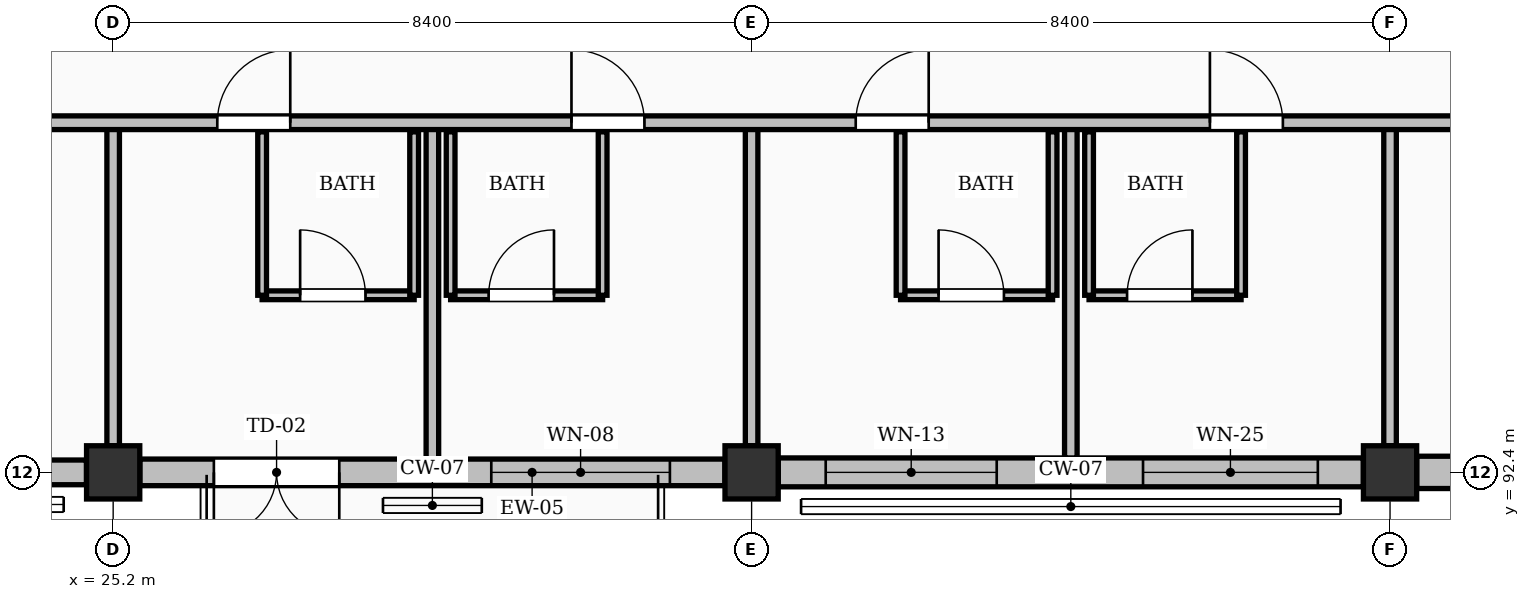
"""IFC4 building model, lengths in metres.
Left out: names, types, materials, properties, quantities, classifications, styles, units other than length and angle.
Written with IfcOpenShell. Run it as: python <this file> out.ifc"""

import sys

from ifc_helpers import new_model, si_unit, direction, frame, frame_2d, origin, origin_2d, place, context, subcontext, project, spatial, rectangle, extrude, element, fill, save


model = new_model("IFC4")
c1 = context("Model", 3, precision=1e-05, world=origin(), true_north=direction((0.0, 1.0)))
c2 = subcontext(c1, "Body", "Model", "MODEL_VIEW")
j1 = project(units=[si_unit("LENGTHUNIT", "METRE"), si_unit("PLANEANGLEUNIT", "RADIAN")], contexts=[c1])
p1 = place(None, origin())
s1 = spatial("IfcSite", under=j1, at=p1, CompositionType="ELEMENT")
p2 = place(p1, origin())
s2 = spatial("IfcBuilding", under=s1, at=p2, CompositionType="ELEMENT")
p3 = place(p2, frame((0.0, 0.0, 25.2)))
s3 = spatial("IfcBuildingStorey", under=s2, at=p3, CompositionType="ELEMENT", Elevation=25.2)
for number, where, z_axis, x_axis in (
    (1, (25.2, 92.4, 0.0), (0.0, 0.0, 1.0), (1.0, 0.0, 0.0)),
    (2, (33.6, 92.4, 0.0), (0.0, 0.0, 1.0), (1.0, 0.0, 0.0)),
    (3, (42.0, 92.4, 0.0), (0.0, 0.0, 1.0), (1.0, 0.0, 0.0)),
):
    element("IfcColumn", number, at=place(p3, frame(where, z_axis=z_axis, x_axis=x_axis)), inside=s3, PredefinedType="COLUMN", context=c2, shape_type="SweptSolid", body=[
        extrude(rectangle(XDim=0.7, YDim=0.7, at=origin_2d()), origin(), (0.0, 0.0, 1.0), 3.36),
    ])
p4 = place(p3, frame((17.151, 92.4, 0.0), z_axis=(0.0, 0.0, 1.0), x_axis=(1.0, 0.0, 0.0)))
e4 = element("IfcWall", 4, at=p4, inside=s3, PredefinedType="SOLIDWALL", context=c2, shape_type="SweptSolid", body=[
    extrude(rectangle(XDim=7.698, YDim=0.325, at=frame_2d((3.849, 0.0))), origin(), (0.0, 0.0, 1.0), 2.494),
])
p5 = place(p4, frame((0.574, 0.0, 0.25)))
e5 = element("IfcOpeningElement", 5, at=p5, cuts=e4, PredefinedType="OPENING", context=c2, shape_type="SweptSolid", body=[
    extrude(rectangle(XDim=2.35, YDim=1.85, at=frame_2d((1.175, 0.925))), frame((0.0, 0.172, 0.0), z_axis=(0.0, -1.0, 0.0), x_axis=(1.0, 0.0, 0.0)), (0.0, 0.0, 1.0), 0.345),
])
p6 = place(p4, frame((4.774, 0.0, 0.25)))
e6 = element("IfcOpeningElement", 6, at=p6, cuts=e4, PredefinedType="OPENING", context=c2, shape_type="SweptSolid", body=[
    extrude(rectangle(XDim=2.35, YDim=1.95, at=frame_2d((1.175, 0.975))), frame((0.0, 0.172, 0.0), z_axis=(0.0, -1.0, 0.0), x_axis=(1.0, 0.0, 0.0)), (0.0, 0.0, 1.0), 0.345),
])
p7 = place(p3, frame((25.551, 92.4, 0.0), z_axis=(0.0, 0.0, 1.0), x_axis=(1.0, 0.0, 0.0)))
e7 = element("IfcWall", 7, at=p7, inside=s3, PredefinedType="SOLIDWALL", context=c2, shape_type="SweptSolid", body=[
    extrude(rectangle(XDim=7.698, YDim=0.35, at=frame_2d((3.849, 0.0))), origin(), (0.0, 0.0, 1.0), 2.494),
])
p8 = place(p7, frame((0.974, 0.0, 0.0)))
e8 = element("IfcOpeningElement", 8, at=p8, cuts=e7, PredefinedType="OPENING", context=c2, shape_type="SweptSolid", body=[
    extrude(rectangle(XDim=1.65, YDim=2.08, at=frame_2d((0.825, 1.04))), frame((0.0, 0.185, 0.0), z_axis=(0.0, -1.0, 0.0), x_axis=(1.0, 0.0, 0.0)), (0.0, 0.0, 1.0), 0.37),
])
p9 = place(p7, frame((4.624, 0.0, 0.25)))
e9 = element("IfcOpeningElement", 9, at=p9, cuts=e7, PredefinedType="OPENING", context=c2, shape_type="SweptSolid", body=[
    extrude(rectangle(XDim=2.35, YDim=1.95, at=frame_2d((1.175, 0.975))), frame((0.0, 0.185, 0.0), z_axis=(0.0, -1.0, 0.0), x_axis=(1.0, 0.0, 0.0)), (0.0, 0.0, 1.0), 0.37),
])
p10 = place(p3, frame((33.951, 92.4, 0.0), z_axis=(0.0, 0.0, 1.0), x_axis=(1.0, 0.0, 0.0)))
e10 = element("IfcWall", 10, at=p10, inside=s3, PredefinedType="SOLIDWALL", context=c2, shape_type="SweptSolid", body=[
    extrude(rectangle(XDim=7.698, YDim=0.38, at=frame_2d((3.849, 0.0))), origin(), (0.0, 0.0, 1.0), 2.494),
])
p11 = place(p10, frame((0.624, 0.0, 0.25)))
e11 = element("IfcOpeningElement", 11, at=p11, cuts=e10, PredefinedType="OPENING", context=c2, shape_type="SweptSolid", body=[
    extrude(rectangle(XDim=2.25, YDim=2.05, at=frame_2d((1.125, 1.025))), frame((0.0, 0.2, 0.0), z_axis=(0.0, -1.0, 0.0), x_axis=(1.0, 0.0, 0.0)), (0.0, 0.0, 1.0), 0.4),
])
p12 = place(p10, frame((4.799, 0.0, 0.25)))
e12 = element("IfcOpeningElement", 12, at=p12, cuts=e10, PredefinedType="OPENING", context=c2, shape_type="SweptSolid", body=[
    extrude(rectangle(XDim=2.3, YDim=1.75, at=frame_2d((1.15, 0.875))), frame((0.0, 0.2, 0.0), z_axis=(0.0, -1.0, 0.0), x_axis=(1.0, 0.0, 0.0)), (0.0, 0.0, 1.0), 0.4),
])
p13 = place(p3, frame((42.351, 92.4, 0.0), z_axis=(0.0, 0.0, 1.0), x_axis=(1.0, 0.0, 0.0)))
e13 = element("IfcWall", 13, at=p13, inside=s3, PredefinedType="SOLIDWALL", context=c2, shape_type="SweptSolid", body=[
    extrude(rectangle(XDim=7.698, YDim=0.425, at=frame_2d((3.849, 0.0))), origin(), (0.0, 0.0, 1.0), 2.494),
])
p14 = place(p13, frame((0.924, 0.0, 0.0)))
e14 = element("IfcOpeningElement", 14, at=p14, cuts=e13, PredefinedType="OPENING", context=c2, shape_type="SweptSolid", body=[
    extrude(rectangle(XDim=1.75, YDim=2.08, at=frame_2d((0.875, 1.04))), frame((0.0, 0.223, 0.0), z_axis=(0.0, -1.0, 0.0), x_axis=(1.0, 0.0, 0.0)), (0.0, 0.0, 1.0), 0.445),
])
p15 = place(p13, frame((4.649, 0.0, 0.25)))
e15 = element("IfcOpeningElement", 15, at=p15, cuts=e13, PredefinedType="OPENING", context=c2, shape_type="SweptSolid", body=[
    extrude(rectangle(XDim=2.3, YDim=1.75, at=frame_2d((1.15, 0.875))), frame((0.0, 0.223, 0.0), z_axis=(0.0, -1.0, 0.0), x_axis=(1.0, 0.0, 0.0)), (0.0, 0.0, 1.0), 0.445),
])
p16 = place(p3, frame((27.16, 94.73, 0.0), z_axis=(0.0, 0.0, 1.0), x_axis=(1.0, 0.0, 0.0)))
e16 = element("IfcWall", 16, at=p16, inside=s3, PredefinedType="PARTITIONING", context=c2, shape_type="SweptSolid", body=[
    extrude(rectangle(XDim=2.0, YDim=0.115, at=frame_2d((1.0, 0.0))), origin(), (0.0, 0.0, 1.0), 3.12),
])
p17 = place(p16, frame((0.5, 0.0, 0.0)))
e17 = element("IfcOpeningElement", 17, at=p17, cuts=e16, PredefinedType="OPENING", context=c2, shape_type="SweptSolid", body=[
    extrude(rectangle(XDim=0.86, YDim=2.05, at=frame_2d((0.43, 1.025))), frame((0.0, 0.067, 0.0), z_axis=(0.0, -1.0, 0.0), x_axis=(1.0, 0.0, 0.0)), (0.0, 0.0, 1.0), 0.135),
])
p18 = place(p3, frame((27.16, 94.73, 0.0), z_axis=(0.0, 0.0, 1.0), x_axis=(0.0, 1.0, 0.0)))
e18 = element("IfcWall", 18, at=p18, inside=s3, PredefinedType="PARTITIONING", context=c2, shape_type="SweptSolid", body=[
    extrude(rectangle(XDim=2.15, YDim=0.115, at=frame_2d((1.075, 0.0))), origin(), (0.0, 0.0, 1.0), 2.642),
])
p19 = place(p3, frame((29.16, 94.73, 0.0), z_axis=(0.0, 0.0, 1.0), x_axis=(0.0, 1.0, 0.0)))
e19 = element("IfcWall", 19, at=p19, inside=s3, PredefinedType="PARTITIONING", context=c2, shape_type="SweptSolid", body=[
    extrude(rectangle(XDim=2.15, YDim=0.115, at=frame_2d((1.075, 0.0))), origin(), (0.0, 0.0, 1.0), 3.12),
])
p20 = place(p3, frame((29.64, 94.73, 0.0), z_axis=(0.0, 0.0, 1.0), x_axis=(1.0, 0.0, 0.0)))
e20 = element("IfcWall", 20, at=p20, inside=s3, PredefinedType="PARTITIONING", context=c2, shape_type="SweptSolid", body=[
    extrude(rectangle(XDim=2.0, YDim=0.115, at=frame_2d((1.0, 0.0))), origin(), (0.0, 0.0, 1.0), 3.12),
])
p21 = place(p20, frame((0.5, 0.0, 0.0)))
e21 = element("IfcOpeningElement", 21, at=p21, cuts=e20, PredefinedType="OPENING", context=c2, shape_type="SweptSolid", body=[
    extrude(rectangle(XDim=0.86, YDim=2.05, at=frame_2d((0.43, 1.025))), frame((0.0, 0.067, 0.0), z_axis=(0.0, -1.0, 0.0), x_axis=(1.0, 0.0, 0.0)), (0.0, 0.0, 1.0), 0.135),
])
p22 = place(p3, frame((29.64, 94.73, 0.0), z_axis=(0.0, 0.0, 1.0), x_axis=(0.0, 1.0, 0.0)))
e22 = element("IfcWall", 22, at=p22, inside=s3, PredefinedType="PARTITIONING", context=c2, shape_type="SweptSolid", body=[
    extrude(rectangle(XDim=2.15, YDim=0.115, at=frame_2d((1.075, 0.0))), origin(), (0.0, 0.0, 1.0), 3.12),
])
p23 = place(p3, frame((31.64, 94.73, 0.0), z_axis=(0.0, 0.0, 1.0), x_axis=(0.0, 1.0, 0.0)))
e23 = element("IfcWall", 23, at=p23, inside=s3, PredefinedType="PARTITIONING", context=c2, shape_type="SweptSolid", body=[
    extrude(rectangle(XDim=2.15, YDim=0.115, at=frame_2d((1.075, 0.0))), origin(), (0.0, 0.0, 1.0), 2.642),
])
p24 = place(p3, frame((29.4, 92.575, 0.0), z_axis=(0.0, 0.0, 1.0), x_axis=(0.0, 1.0, 0.0)))
e24 = element("IfcWall", 24, at=p24, inside=s3, PredefinedType="PARTITIONING", context=c2, shape_type="SweptSolid", body=[
    extrude(rectangle(XDim=4.425, YDim=0.165, at=frame_2d((2.212, 0.0))), origin(), (0.0, 0.0, 1.0), 3.12),
])
p25 = place(p3, frame((25.2, 92.75, 0.0), z_axis=(0.0, 0.0, 1.0), x_axis=(0.0, 1.0, 0.0)))
e25 = element("IfcWall", 25, at=p25, inside=s3, PredefinedType="PARTITIONING", context=c2, shape_type="SweptSolid", body=[
    extrude(rectangle(XDim=4.25, YDim=0.165, at=frame_2d((2.125, 0.0))), origin(), (0.0, 0.0, 1.0), 2.455),
])
p26 = place(p3, frame((35.56, 94.73, 0.0), z_axis=(0.0, 0.0, 1.0), x_axis=(1.0, 0.0, 0.0)))
e26 = element("IfcWall", 26, at=p26, inside=s3, PredefinedType="PARTITIONING", context=c2, shape_type="SweptSolid", body=[
    extrude(rectangle(XDim=2.0, YDim=0.115, at=frame_2d((1.0, 0.0))), origin(), (0.0, 0.0, 1.0), 3.12),
])
p27 = place(p26, frame((0.5, 0.0, 0.0)))
e27 = element("IfcOpeningElement", 27, at=p27, cuts=e26, PredefinedType="OPENING", context=c2, shape_type="SweptSolid", body=[
    extrude(rectangle(XDim=0.86, YDim=2.05, at=frame_2d((0.43, 1.025))), frame((0.0, 0.067, 0.0), z_axis=(0.0, -1.0, 0.0), x_axis=(1.0, 0.0, 0.0)), (0.0, 0.0, 1.0), 0.135),
])
for number, where, z_axis, x_axis in (
    (28, (35.56, 94.73, 0.0), (0.0, 0.0, 1.0), (0.0, 1.0, 0.0)),
    (29, (37.56, 94.73, 0.0), (0.0, 0.0, 1.0), (0.0, 1.0, 0.0)),
):
    element("IfcWall", number, at=place(p3, frame(where, z_axis=z_axis, x_axis=x_axis)), inside=s3, PredefinedType="PARTITIONING", context=c2, shape_type="SweptSolid", body=[
        extrude(rectangle(XDim=2.15, YDim=0.115, at=frame_2d((1.075, 0.0))), origin(), (0.0, 0.0, 1.0), 3.12),
    ])
p28 = place(p3, frame((38.04, 94.73, 0.0), z_axis=(0.0, 0.0, 1.0), x_axis=(1.0, 0.0, 0.0)))
e30 = element("IfcWall", 30, at=p28, inside=s3, PredefinedType="PARTITIONING", context=c2, shape_type="SweptSolid", body=[
    extrude(rectangle(XDim=2.0, YDim=0.115, at=frame_2d((1.0, 0.0))), origin(), (0.0, 0.0, 1.0), 3.12),
])
p29 = place(p28, frame((0.5, 0.0, 0.0)))
e31 = element("IfcOpeningElement", 31, at=p29, cuts=e30, PredefinedType="OPENING", context=c2, shape_type="SweptSolid", body=[
    extrude(rectangle(XDim=0.86, YDim=2.05, at=frame_2d((0.43, 1.025))), frame((0.0, 0.067, 0.0), z_axis=(0.0, -1.0, 0.0), x_axis=(1.0, 0.0, 0.0)), (0.0, 0.0, 1.0), 0.135),
])
for number, where, z_axis, x_axis in (
    (32, (38.04, 94.73, 0.0), (0.0, 0.0, 1.0), (0.0, 1.0, 0.0)),
    (33, (40.04, 94.73, 0.0), (0.0, 0.0, 1.0), (0.0, 1.0, 0.0)),
):
    element("IfcWall", number, at=place(p3, frame(where, z_axis=z_axis, x_axis=x_axis)), inside=s3, PredefinedType="PARTITIONING", context=c2, shape_type="SweptSolid", body=[
        extrude(rectangle(XDim=2.15, YDim=0.115, at=frame_2d((1.075, 0.0))), origin(), (0.0, 0.0, 1.0), 3.12),
    ])
p30 = place(p3, frame((37.8, 92.59, 0.0), z_axis=(0.0, 0.0, 1.0), x_axis=(0.0, 1.0, 0.0)))
e34 = element("IfcWall", 34, at=p30, inside=s3, PredefinedType="PARTITIONING", context=c2, shape_type="SweptSolid", body=[
    extrude(rectangle(XDim=4.41, YDim=0.165, at=frame_2d((2.205, 0.0))), origin(), (0.0, 0.0, 1.0), 3.12),
])
for number, where, z_axis, x_axis in (
    (35, (33.6, 92.75, 0.0), (0.0, 0.0, 1.0), (0.0, 1.0, 0.0)),
    (36, (42.0, 92.75, 0.0), (0.0, 0.0, 1.0), (0.0, 1.0, 0.0)),
):
    element("IfcWall", number, at=place(p3, frame(where, z_axis=z_axis, x_axis=x_axis)), inside=s3, PredefinedType="PARTITIONING", context=c2, shape_type="SweptSolid", body=[
        extrude(rectangle(XDim=4.25, YDim=0.165, at=frame_2d((2.125, 0.0))), origin(), (0.0, 0.0, 1.0), 2.455),
    ])
p31 = place(p3, frame((0.14, 97.0, 0.0), z_axis=(0.0, 0.0, 1.0), x_axis=(1.0, 0.0, 0.0)))
e37 = element("IfcWall", 37, at=p31, inside=s3, PredefinedType="PARTITIONING", context=c2, shape_type="SweptSolid", body=[
    extrude(rectangle(XDim=50.26, YDim=0.18, at=frame_2d((25.13, 0.0))), origin(), (0.0, 0.0, 1.0), 3.12),
])
p32 = place(p31, frame((1.23, 0.0, 0.0)))
e38 = element("IfcOpeningElement", 38, at=p32, cuts=e37, PredefinedType="OPENING", context=c2, shape_type="SweptSolid", body=[
    extrude(rectangle(XDim=0.96, YDim=2.15, at=frame_2d((0.48, 1.075))), frame((0.0, 0.1, 0.0), z_axis=(0.0, -1.0, 0.0), x_axis=(1.0, 0.0, 0.0)), (0.0, 0.0, 1.0), 0.2),
])
p33 = place(p31, frame((5.89, 0.0, 0.0)))
e39 = element("IfcOpeningElement", 39, at=p33, cuts=e37, PredefinedType="OPENING", context=c2, shape_type="SweptSolid", body=[
    extrude(rectangle(XDim=0.96, YDim=2.15, at=frame_2d((0.48, 1.075))), frame((0.0, 0.1, 0.0), z_axis=(0.0, -1.0, 0.0), x_axis=(1.0, 0.0, 0.0)), (0.0, 0.0, 1.0), 0.2),
])
p34 = place(p31, frame((11.66, 0.0, 0.0)))
e40 = element("IfcOpeningElement", 40, at=p34, cuts=e37, PredefinedType="OPENING", context=c2, shape_type="SweptSolid", body=[
    extrude(rectangle(XDim=1.62, YDim=2.2, at=frame_2d((0.81, 1.1))), frame((0.0, 0.1, 0.0), z_axis=(0.0, -1.0, 0.0), x_axis=(1.0, 0.0, 0.0)), (0.0, 0.0, 1.0), 0.2),
])
p35 = place(p31, frame((18.03, 0.0, 0.0)))
e41 = element("IfcOpeningElement", 41, at=p35, cuts=e37, PredefinedType="OPENING", context=c2, shape_type="SweptSolid", body=[
    extrude(rectangle(XDim=0.96, YDim=2.15, at=frame_2d((0.48, 1.075))), frame((0.0, 0.1, 0.0), z_axis=(0.0, -1.0, 0.0), x_axis=(1.0, 0.0, 0.0)), (0.0, 0.0, 1.0), 0.2),
])
p36 = place(p31, frame((22.69, 0.0, 0.0)))
e42 = element("IfcOpeningElement", 42, at=p36, cuts=e37, PredefinedType="OPENING", context=c2, shape_type="SweptSolid", body=[
    extrude(rectangle(XDim=0.96, YDim=2.15, at=frame_2d((0.48, 1.075))), frame((0.0, 0.1, 0.0), z_axis=(0.0, -1.0, 0.0), x_axis=(1.0, 0.0, 0.0)), (0.0, 0.0, 1.0), 0.2),
])
p37 = place(p31, frame((26.43, 0.0, 0.0)))
e43 = element("IfcOpeningElement", 43, at=p37, cuts=e37, PredefinedType="OPENING", context=c2, shape_type="SweptSolid", body=[
    extrude(rectangle(XDim=0.96, YDim=2.15, at=frame_2d((0.48, 1.075))), frame((0.0, 0.1, 0.0), z_axis=(0.0, -1.0, 0.0), x_axis=(1.0, 0.0, 0.0)), (0.0, 0.0, 1.0), 0.2),
])
p38 = place(p31, frame((31.09, 0.0, 0.0)))
e44 = element("IfcOpeningElement", 44, at=p38, cuts=e37, PredefinedType="OPENING", context=c2, shape_type="SweptSolid", body=[
    extrude(rectangle(XDim=0.96, YDim=2.15, at=frame_2d((0.48, 1.075))), frame((0.0, 0.1, 0.0), z_axis=(0.0, -1.0, 0.0), x_axis=(1.0, 0.0, 0.0)), (0.0, 0.0, 1.0), 0.2),
])
p39 = place(p31, frame((34.83, 0.0, 0.0)))
e45 = element("IfcOpeningElement", 45, at=p39, cuts=e37, PredefinedType="OPENING", context=c2, shape_type="SweptSolid", body=[
    extrude(rectangle(XDim=0.96, YDim=2.15, at=frame_2d((0.48, 1.075))), frame((0.0, 0.1, 0.0), z_axis=(0.0, -1.0, 0.0), x_axis=(1.0, 0.0, 0.0)), (0.0, 0.0, 1.0), 0.2),
])
p40 = place(p31, frame((39.49, 0.0, 0.0)))
e46 = element("IfcOpeningElement", 46, at=p40, cuts=e37, PredefinedType="OPENING", context=c2, shape_type="SweptSolid", body=[
    extrude(rectangle(XDim=0.96, YDim=2.15, at=frame_2d((0.48, 1.075))), frame((0.0, 0.1, 0.0), z_axis=(0.0, -1.0, 0.0), x_axis=(1.0, 0.0, 0.0)), (0.0, 0.0, 1.0), 0.2),
])
p41 = place(p31, frame((43.23, 0.0, 0.0)))
e47 = element("IfcOpeningElement", 47, at=p41, cuts=e37, PredefinedType="OPENING", context=c2, shape_type="SweptSolid", body=[
    extrude(rectangle(XDim=0.96, YDim=2.15, at=frame_2d((0.48, 1.075))), frame((0.0, 0.1, 0.0), z_axis=(0.0, -1.0, 0.0), x_axis=(1.0, 0.0, 0.0)), (0.0, 0.0, 1.0), 0.2),
])
p42 = place(p31, frame((47.89, 0.0, 0.0)))
e48 = element("IfcOpeningElement", 48, at=p42, cuts=e37, PredefinedType="OPENING", context=c2, shape_type="SweptSolid", body=[
    extrude(rectangle(XDim=0.96, YDim=2.15, at=frame_2d((0.48, 1.075))), frame((0.0, 0.1, 0.0), z_axis=(0.0, -1.0, 0.0), x_axis=(1.0, 0.0, 0.0)), (0.0, 0.0, 1.0), 0.2),
])
p43 = place(p8, frame((1.65, 0.0, 0.0), z_axis=(0.0, 0.0, 1.0), x_axis=(-1.0, 0.0, 0.0)))
e49 = element("IfcDoor", 49, at=p43, inside=s3, OperationType="DOUBLE_DOOR_SINGLE_SWING", PredefinedType="DOOR", context=c2, shape_type="SweptSolid", body=[
    extrude(rectangle(XDim=1.65, YDim=2.08, at=frame_2d((0.825, 1.04))), frame((0.0, 0.025, 0.0), z_axis=(0.0, -1.0, 0.0), x_axis=(1.0, 0.0, 0.0)), (0.0, 0.0, 1.0), 0.05),
])
fill(e8, e49)
p44 = place(p9, origin())
e50 = element("IfcWindow", 50, at=p44, inside=s3, PartitioningType="DOUBLE_PANEL_VERTICAL", PredefinedType="WINDOW", context=c2, shape_type="SweptSolid", body=[
    extrude(rectangle(XDim=2.35, YDim=1.95, at=frame_2d((1.175, 0.975))), frame((0.0, 0.03, 0.0), z_axis=(0.0, -1.0, 0.0), x_axis=(1.0, 0.0, 0.0)), (0.0, 0.0, 1.0), 0.06),
])
fill(e9, e50)
p45 = place(p11, origin())
e51 = element("IfcWindow", 51, at=p45, inside=s3, PartitioningType="DOUBLE_PANEL_VERTICAL", PredefinedType="WINDOW", context=c2, shape_type="SweptSolid", body=[
    extrude(rectangle(XDim=2.25, YDim=2.05, at=frame_2d((1.125, 1.025))), frame((0.0, 0.03, 0.0), z_axis=(0.0, -1.0, 0.0), x_axis=(1.0, 0.0, 0.0)), (0.0, 0.0, 1.0), 0.06),
])
fill(e11, e51)
p46 = place(p12, origin())
e52 = element("IfcWindow", 52, at=p46, inside=s3, PartitioningType="DOUBLE_PANEL_VERTICAL", PredefinedType="WINDOW", context=c2, shape_type="SweptSolid", body=[
    extrude(rectangle(XDim=2.3, YDim=1.75, at=frame_2d((1.15, 0.875))), frame((0.0, 0.03, 0.0), z_axis=(0.0, -1.0, 0.0), x_axis=(1.0, 0.0, 0.0)), (0.0, 0.0, 1.0), 0.06),
])
fill(e12, e52)
p47 = place(p17, origin())
e53 = element("IfcDoor", 53, at=p47, inside=s3, OperationType="SINGLE_SWING_LEFT", PredefinedType="DOOR", context=c2, shape_type="SweptSolid", body=[
    extrude(rectangle(XDim=0.86, YDim=2.05, at=frame_2d((0.43, 1.025))), frame((0.0, 0.025, 0.0), z_axis=(0.0, -1.0, 0.0), x_axis=(1.0, 0.0, 0.0)), (0.0, 0.0, 1.0), 0.05),
])
fill(e17, e53)
p48 = place(p21, origin())
e54 = element("IfcDoor", 54, at=p48, inside=s3, OperationType="SINGLE_SWING_RIGHT", PredefinedType="DOOR", context=c2, shape_type="SweptSolid", body=[
    extrude(rectangle(XDim=0.86, YDim=2.05, at=frame_2d((0.43, 1.025))), frame((0.0, 0.025, 0.0), z_axis=(0.0, -1.0, 0.0), x_axis=(1.0, 0.0, 0.0)), (0.0, 0.0, 1.0), 0.05),
])
fill(e21, e54)
p49 = place(p27, origin())
e55 = element("IfcDoor", 55, at=p49, inside=s3, OperationType="SINGLE_SWING_LEFT", PredefinedType="DOOR", context=c2, shape_type="SweptSolid", body=[
    extrude(rectangle(XDim=0.86, YDim=2.05, at=frame_2d((0.43, 1.025))), frame((0.0, 0.025, 0.0), z_axis=(0.0, -1.0, 0.0), x_axis=(1.0, 0.0, 0.0)), (0.0, 0.0, 1.0), 0.05),
])
fill(e27, e55)
p50 = place(p29, origin())
e56 = element("IfcDoor", 56, at=p50, inside=s3, OperationType="SINGLE_SWING_RIGHT", PredefinedType="DOOR", context=c2, shape_type="SweptSolid", body=[
    extrude(rectangle(XDim=0.86, YDim=2.05, at=frame_2d((0.43, 1.025))), frame((0.0, 0.025, 0.0), z_axis=(0.0, -1.0, 0.0), x_axis=(1.0, 0.0, 0.0)), (0.0, 0.0, 1.0), 0.05),
])
fill(e31, e56)
p51 = place(p37, origin())
e57 = element("IfcDoor", 57, at=p51, inside=s3, OperationType="SINGLE_SWING_RIGHT", PredefinedType="DOOR", context=c2, shape_type="SweptSolid", body=[
    extrude(rectangle(XDim=0.96, YDim=2.15, at=frame_2d((0.48, 1.075))), frame((0.0, 0.025, 0.0), z_axis=(0.0, -1.0, 0.0), x_axis=(1.0, 0.0, 0.0)), (0.0, 0.0, 1.0), 0.05),
])
fill(e43, e57)
p52 = place(p38, origin())
e58 = element("IfcDoor", 58, at=p52, inside=s3, OperationType="SINGLE_SWING_LEFT", PredefinedType="DOOR", context=c2, shape_type="SweptSolid", body=[
    extrude(rectangle(XDim=0.96, YDim=2.15, at=frame_2d((0.48, 1.075))), frame((0.0, 0.025, 0.0), z_axis=(0.0, -1.0, 0.0), x_axis=(1.0, 0.0, 0.0)), (0.0, 0.0, 1.0), 0.05),
])
fill(e44, e58)
p53 = place(p39, origin())
e59 = element("IfcDoor", 59, at=p53, inside=s3, OperationType="SINGLE_SWING_RIGHT", PredefinedType="DOOR", context=c2, shape_type="SweptSolid", body=[
    extrude(rectangle(XDim=0.96, YDim=2.15, at=frame_2d((0.48, 1.075))), frame((0.0, 0.025, 0.0), z_axis=(0.0, -1.0, 0.0), x_axis=(1.0, 0.0, 0.0)), (0.0, 0.0, 1.0), 0.05),
])
fill(e45, e59)
p54 = place(p40, origin())
e60 = element("IfcDoor", 60, at=p54, inside=s3, OperationType="SINGLE_SWING_LEFT", PredefinedType="DOOR", context=c2, shape_type="SweptSolid", body=[
    extrude(rectangle(XDim=0.96, YDim=2.15, at=frame_2d((0.48, 1.075))), frame((0.0, 0.025, 0.0), z_axis=(0.0, -1.0, 0.0), x_axis=(1.0, 0.0, 0.0)), (0.0, 0.0, 1.0), 0.05),
])
fill(e46, e60)
save(model, sys.argv[1])
